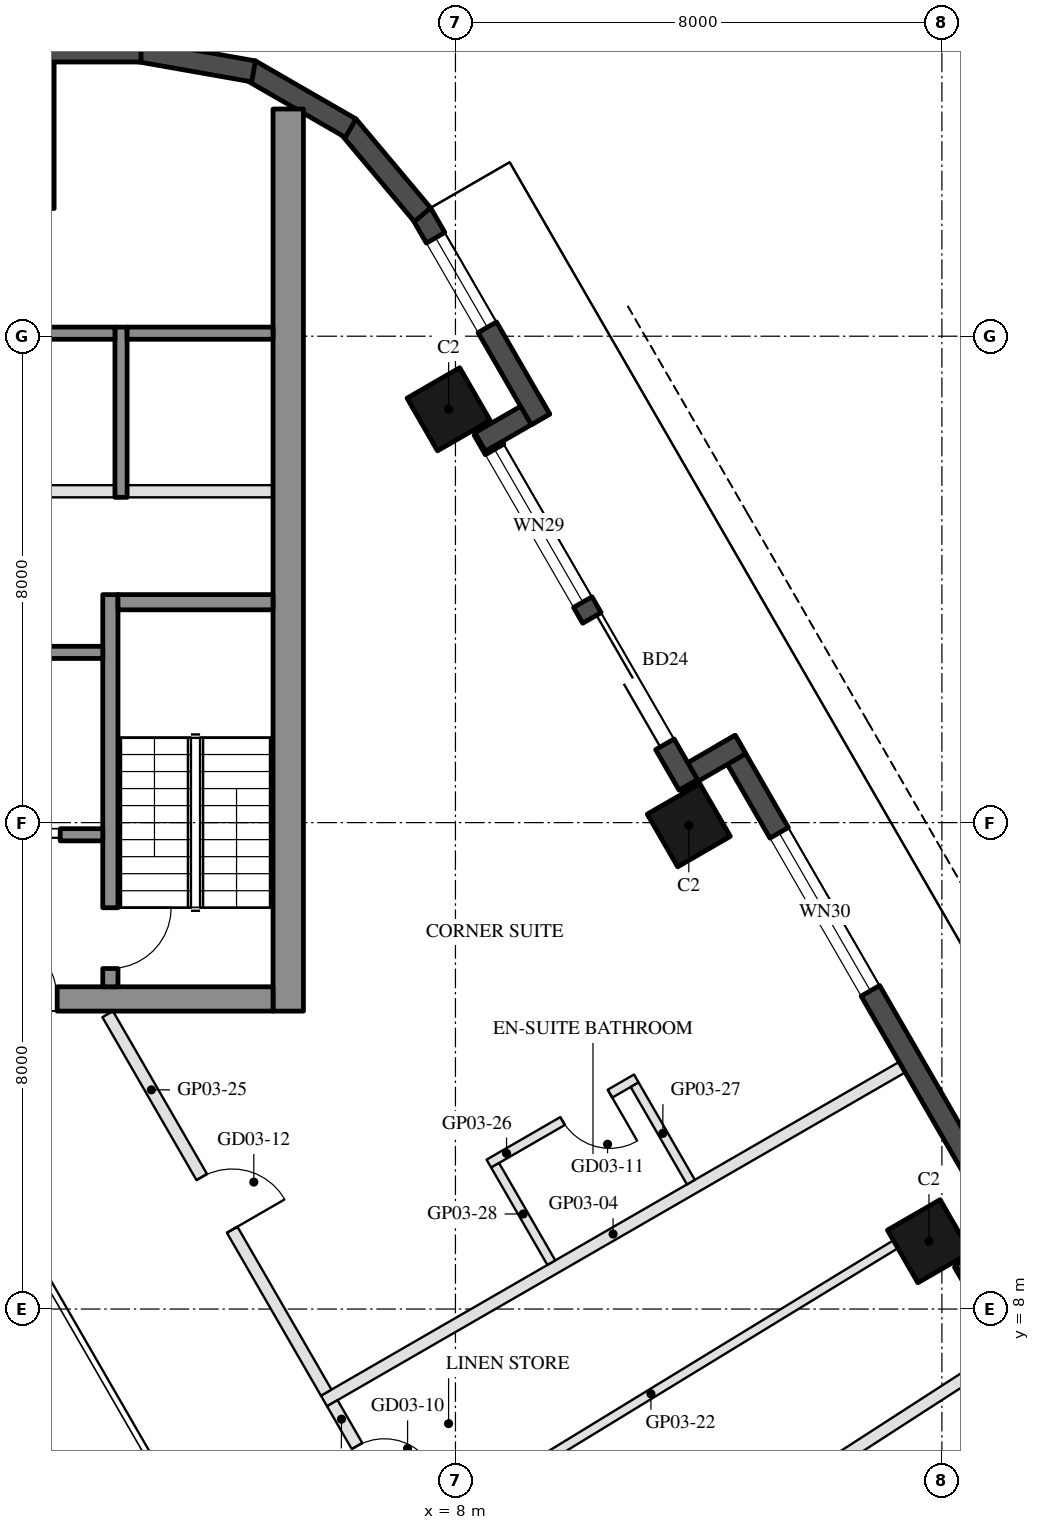
"""IFC4 building model, lengths in metres.
Left out: names, types, materials, properties, quantities, classifications, styles, units other than length and angle.
Written with IfcOpenShell. Run it as: python <this file> out.ifc"""

import sys

from ifc_helpers import new_model, si_unit, direction, frame, frame_2d, origin, origin_2d, place, context, subcontext, project, spatial, rectangle, hollow_rectangle, extrude, element, fill, save


model = new_model("IFC4")
c1 = context("Model", 3, precision=1e-05, world=origin(), true_north=direction((0.0, 1.0)))
c2 = subcontext(c1, "Body", "Model", "MODEL_VIEW")
j1 = project(units=[si_unit("LENGTHUNIT", "METRE"), si_unit("PLANEANGLEUNIT", "RADIAN")], contexts=[c1])
p1 = place(None, origin())
s1 = spatial("IfcSite", under=j1, at=p1, CompositionType="ELEMENT")
p2 = place(p1, origin())
s2 = spatial("IfcBuilding", under=s1, at=p2, CompositionType="ELEMENT")
p3 = place(p2, frame((0.0, 0.0, 65.0)))
s3 = spatial("IfcBuildingStorey", under=s2, at=p3, CompositionType="ELEMENT", Elevation=65.0)
for number, where, z_axis, x_axis in (
    (1, (15.788, 9.115, 0.0), (0.0, 0.0, 1.0), (-0.5, 0.866, 0.0)),
    (2, (11.838, 15.957, 0.0), (0.0, 0.0, 1.0), (-0.5, 0.866, 0.0)),
    (3, (7.888, 22.798, 0.0), (0.0, 0.0, 1.0), (-0.5, 0.866, 0.0)),
):
    element("IfcColumn", number, at=place(p3, frame(where, z_axis=z_axis, x_axis=x_axis)), inside=s3, PredefinedType="COLUMN", context=c2, shape_type="SweptSolid", body=[
        extrude(hollow_rectangle(XDim=1.0, YDim=1.0, WallThickness=0.045, at=origin_2d()), origin(), (0.0, 0.0, 1.0), 3.7),
    ])
p4 = place(p3, frame((0.0, 27.3, 0.0), z_axis=(0.0, 0.0, 1.0), x_axis=(1.0, 0.0, 0.0)))
e4 = element("IfcColumn", 4, at=p4, inside=s3, PredefinedType="COLUMN", context=c2, shape_type="SweptSolid", body=[
    extrude(hollow_rectangle(XDim=2.8, YDim=2.4, WallThickness=0.07, at=origin_2d()), origin(), (0.0, 0.0, 1.0), 3.7),
])
p5 = place(p3, frame((19.729, 2.938, 0.0), z_axis=(0.0, 0.0, 1.0), x_axis=(-0.499976430342, 0.866039011305, 0.0)))
e5 = element("IfcWall", 5, at=p5, inside=s3, PredefinedType="SOLIDWALL", context=c2, shape_type="SweptSolid", body=[
    extrude(rectangle(XDim=6.74, YDim=0.35, at=frame_2d((3.37, 0.0))), origin(), (0.0, 0.0, 1.0), 3.55),
])
p6 = place(p5, frame((0.77, 0.0, 0.3)))
e6 = element("IfcOpeningElement", 6, at=p6, cuts=e5, PredefinedType="OPENING", context=c2, shape_type="SweptSolid", body=[
    extrude(rectangle(XDim=1.7, YDim=2.65, at=frame_2d((0.85, 1.325))), frame((0.0, 0.185, 0.0), z_axis=(0.0, -1.0, 0.0), x_axis=(1.0, 0.0, 0.0)), (0.0, 0.0, 1.0), 0.37),
])
p7 = place(p5, frame((2.77, 0.0, 0.3)))
e7 = element("IfcOpeningElement", 7, at=p7, cuts=e5, PredefinedType="OPENING", context=c2, shape_type="SweptSolid", body=[
    extrude(rectangle(XDim=1.7, YDim=2.65, at=frame_2d((0.85, 1.325))), frame((0.0, 0.185, 0.0), z_axis=(0.0, -1.0, 0.0), x_axis=(1.0, 0.0, 0.0)), (0.0, 0.0, 1.0), 0.37),
])
p8 = place(p3, frame((16.306, 8.577, 0.0), z_axis=(0.0, 0.0, 1.0), x_axis=(0.866092288191, 0.499884134912, 0.0)))
e8 = element("IfcWall", 8, at=p8, inside=s3, PredefinedType="SOLIDWALL", context=c2, shape_type="SweptSolid", body=[
    extrude(rectangle(XDim=1.22, YDim=0.35, at=frame_2d((0.61, 0.0))), origin(), (0.0, 0.0, 1.0), 3.55),
])
p9 = place(p3, frame((17.299, 8.948, 0.0), z_axis=(0.0, 0.0, 1.0), x_axis=(-0.500010041276, 0.866019606374, 0.0)))
e9 = element("IfcWall", 9, at=p9, inside=s3, PredefinedType="SOLIDWALL", context=c2, shape_type="SweptSolid", body=[
    extrude(rectangle(XDim=9.7, YDim=0.35, at=frame_2d((4.85, 0.0))), origin(), (0.0, 0.0, 1.0), 3.55),
])
p10 = place(p9, frame((4.949, 0.0, 0.3)))
e10 = element("IfcOpeningElement", 10, at=p10, cuts=e9, PredefinedType="OPENING", context=c2, shape_type="SweptSolid", body=[
    extrude(rectangle(XDim=3.0, YDim=2.65, at=frame_2d((1.5, 1.325))), frame((0.0, 0.185, 0.0), z_axis=(0.0, -1.0, 0.0), x_axis=(1.0, 0.0, 0.0)), (0.0, 0.0, 1.0), 0.37),
])
p11 = place(p3, frame((12.688, 17.284, 0.0), z_axis=(0.0, 0.0, 1.0), x_axis=(-0.865955602162, -0.500120880472, 0.0)))
e11 = element("IfcWall", 11, at=p11, inside=s3, PredefinedType="SOLIDWALL", context=c2, shape_type="SweptSolid", body=[
    extrude(rectangle(XDim=1.22, YDim=0.35, at=frame_2d((0.61, 0.0))), origin(), (0.0, 0.0, 1.0), 3.55),
])
p12 = place(p3, frame((11.829, 16.621, 0.0), z_axis=(0.0, 0.0, 1.0), x_axis=(-0.500003597184, 0.866023326939, 0.0)))
e12 = element("IfcWall", 12, at=p12, inside=s3, PredefinedType="SOLIDWALL", context=c2, shape_type="SweptSolid", body=[
    extrude(rectangle(XDim=6.74, YDim=0.35, at=frame_2d((3.37, 0.0))), origin(), (0.0, 0.0, 1.0), 3.55),
])
p13 = place(p12, frame((0.77, 0.0, 0.0)))
e13 = element("IfcOpeningElement", 13, at=p13, cuts=e12, PredefinedType="OPENING", context=c2, shape_type="SweptSolid", body=[
    extrude(rectangle(XDim=2.4, YDim=2.4, at=frame_2d((1.2, 1.2))), frame((0.0, 0.185, 0.0), z_axis=(0.0, -1.0, 0.0), x_axis=(1.0, 0.0, 0.0)), (0.0, 0.0, 1.0), 0.37),
])
p14 = place(p12, frame((3.47, 0.0, 0.3)))
e14 = element("IfcOpeningElement", 14, at=p14, cuts=e12, PredefinedType="OPENING", context=c2, shape_type="SweptSolid", body=[
    extrude(rectangle(XDim=2.9, YDim=2.65, at=frame_2d((1.45, 1.325))), frame((0.0, 0.185, 0.0), z_axis=(0.0, -1.0, 0.0), x_axis=(1.0, 0.0, 0.0)), (0.0, 0.0, 1.0), 0.37),
])
p15 = place(p3, frame((8.406, 22.26, 0.0), z_axis=(0.0, 0.0, 1.0), x_axis=(0.865955602162, 0.500120880472, 0.0)))
e15 = element("IfcWall", 15, at=p15, inside=s3, PredefinedType="SOLIDWALL", context=c2, shape_type="SweptSolid", body=[
    extrude(rectangle(XDim=1.22, YDim=0.35, at=frame_2d((0.61, 0.0))), origin(), (0.0, 0.0, 1.0), 3.55),
])
p16 = place(p3, frame((9.398, 22.631, 0.0), z_axis=(0.0, 0.0, 1.0), x_axis=(-0.499954521343, 0.866051659307, 0.0)))
e16 = element("IfcWall", 16, at=p16, inside=s3, PredefinedType="SOLIDWALL", context=c2, shape_type="SweptSolid", body=[
    extrude(rectangle(XDim=3.916, YDim=0.35, at=frame_2d((1.958, 0.0))), origin(), (0.0, 0.0, 1.0), 3.55),
])
p17 = place(p16, frame((1.75, 0.0, 0.3)))
e17 = element("IfcOpeningElement", 17, at=p17, cuts=e16, PredefinedType="OPENING", context=c2, shape_type="SweptSolid", body=[
    extrude(rectangle(XDim=1.7, YDim=2.65, at=frame_2d((0.85, 1.325))), frame((0.0, 0.185, 0.0), z_axis=(0.0, -1.0, 0.0), x_axis=(1.0, 0.0, 0.0)), (0.0, 0.0, 1.0), 0.37),
])
p18 = place(p3, frame((7.458, 25.998, 0.0), z_axis=(0.0, 0.0, 1.0), x_axis=(-0.642808304945, 0.766027077259, 0.0)))
e18 = element("IfcWall", 18, at=p18, inside=s3, PredefinedType="SOLIDWALL", context=c2, shape_type="SweptSolid", body=[
    extrude(rectangle(XDim=1.91, YDim=0.35, at=frame_2d((0.955, 0.0))), origin(), (0.0, 0.0, 1.0), 3.55),
])
for number, where, z_axis, x_axis in (
    (19, (6.277, 27.422, 0.0), (0.0, 0.0, 1.0), (-0.866, 0.5, 0.0)),
    (20, (4.68, 28.356, 0.0), (0.0, 0.0, 1.0), (-0.985, 0.174, 0.0)),
):
    element("IfcWall", number, at=place(p3, frame(where, z_axis=z_axis, x_axis=x_axis)), inside=s3, PredefinedType="SOLIDWALL", context=c2, shape_type="SweptSolid", body=[
        extrude(rectangle(XDim=1.91, YDim=0.35, at=frame_2d((0.955, 0.0))), origin(), (0.0, 0.0, 1.0), 3.55),
    ])
p19 = place(p3, frame((2.829, 28.685, 0.0), z_axis=(0.0, 0.0, 1.0), x_axis=(-1.0, 0.0, 0.0)))
e21 = element("IfcWall", 21, at=p19, inside=s3, PredefinedType="SOLIDWALL", context=c2, shape_type="SweptSolid", body=[
    extrude(rectangle(XDim=5.658, YDim=0.35, at=frame_2d((2.829, 0.0))), origin(), (0.0, 0.0, 1.0), 3.55),
])
p20 = place(p3, frame((5.25, 12.9, 0.0), z_axis=(0.0, 0.0, 1.0), x_axis=(0.0, 1.0, 0.0)))
e22 = element("IfcWall", 22, at=p20, inside=s3, PredefinedType="SHEAR", context=c2, shape_type="SweptSolid", body=[
    extrude(rectangle(XDim=14.837, YDim=0.5, at=frame_2d((7.418, 0.0))), origin(), (0.0, 0.0, 1.0), 3.5),
])
p21 = place(p3, frame((5.0, 13.1, 0.0), z_axis=(0.0, 0.0, 1.0), x_axis=(-1.0, 0.0, 0.0)))
e23 = element("IfcWall", 23, at=p21, inside=s3, PredefinedType="SHEAR", context=c2, shape_type="SweptSolid", body=[
    extrude(rectangle(XDim=10.0, YDim=0.4, at=frame_2d((5.0, 0.0))), origin(), (0.0, 0.0, 1.0), 3.5),
])
p22 = place(p21, frame((3.55, 0.0, 0.0)))
e24 = element("IfcOpeningElement", 24, at=p22, cuts=e23, PredefinedType="OPENING", context=c2, shape_type="SweptSolid", body=[
    extrude(rectangle(XDim=1.1, YDim=2.1, at=frame_2d((0.55, 1.05))), frame((0.0, 0.21, 0.0), z_axis=(0.0, -1.0, 0.0), x_axis=(1.0, 0.0, 0.0)), (0.0, 0.0, 1.0), 0.42),
])
p23 = place(p21, frame((5.85, 0.0, 0.0)))
e25 = element("IfcOpeningElement", 25, at=p23, cuts=e23, PredefinedType="OPENING", context=c2, shape_type="SweptSolid", body=[
    extrude(rectangle(XDim=1.4, YDim=2.1, at=frame_2d((0.7, 1.05))), frame((0.0, 0.21, 0.0), z_axis=(0.0, -1.0, 0.0), x_axis=(1.0, 0.0, 0.0)), (0.0, 0.0, 1.0), 0.42),
])
p24 = place(p3, frame((2.325, 13.3, 0.0), z_axis=(0.0, 0.0, 1.0), x_axis=(0.0, 1.0, 0.0)))
e26 = element("IfcWall", 26, at=p24, inside=s3, PredefinedType="SHEAR", context=c2, shape_type="SweptSolid", body=[
    extrude(rectangle(XDim=6.45, YDim=0.25, at=frame_2d((3.225, 0.0))), origin(), (0.0, 0.0, 1.0), 3.5),
])
p25 = place(p24, frame((0.3, 0.0, 0.0)))
e27 = element("IfcOpeningElement", 27, at=p25, cuts=e26, PredefinedType="OPENING", context=c2, shape_type="SweptSolid", body=[
    extrude(rectangle(XDim=1.0, YDim=2.1, at=frame_2d((0.5, 1.05))), frame((0.0, 0.135, 0.0), z_axis=(0.0, -1.0, 0.0), x_axis=(1.0, 0.0, 0.0)), (0.0, 0.0, 1.0), 0.27),
])
p26 = place(p3, frame((5.0, 19.625, 0.0), z_axis=(0.0, 0.0, 1.0), x_axis=(-1.0, 0.0, 0.0)))
e28 = element("IfcWall", 28, at=p26, inside=s3, PredefinedType="SHEAR", context=c2, shape_type="SweptSolid", body=[
    extrude(rectangle(XDim=2.55, YDim=0.25, at=frame_2d((1.275, 0.0))), origin(), (0.0, 0.0, 1.0), 3.5),
])
p27 = place(p3, frame((2.2, 18.8, 0.0), z_axis=(0.0, 0.0, 1.0), x_axis=(-1.0, 0.0, 0.0)))
e29 = element("IfcWall", 29, at=p27, inside=s3, PredefinedType="SHEAR", context=c2, shape_type="SweptSolid", body=[
    extrude(rectangle(XDim=2.8, YDim=0.2, at=frame_2d((1.4, 0.0))), origin(), (0.0, 0.0, 1.0), 3.5),
])
p28 = place(p3, frame((2.2, 15.8, 0.0), z_axis=(0.0, 0.0, 1.0), x_axis=(-1.0, 0.0, 0.0)))
e30 = element("IfcWall", 30, at=p28, inside=s3, PredefinedType="SHEAR", context=c2, shape_type="SweptSolid", body=[
    extrude(rectangle(XDim=2.8, YDim=0.2, at=frame_2d((1.4, 0.0))), origin(), (0.0, 0.0, 1.0), 3.5),
])
p29 = place(p28, frame((0.7, 0.0, 0.0)))
e31 = element("IfcOpeningElement", 31, at=p29, cuts=e30, PredefinedType="OPENING", context=c2, shape_type="SweptSolid", body=[
    extrude(rectangle(XDim=1.2, YDim=2.1, at=frame_2d((0.6, 1.05))), frame((0.0, 0.11, 0.0), z_axis=(0.0, -1.0, 0.0), x_axis=(1.0, 0.0, 0.0)), (0.0, 0.0, 1.0), 0.22),
])
p30 = place(p3, frame((2.5, 21.35, 0.0), z_axis=(0.0, 0.0, 1.0), x_axis=(0.0, 1.0, 0.0)))
e32 = element("IfcWall", 32, at=p30, inside=s3, PredefinedType="SHEAR", context=c2, shape_type="SweptSolid", body=[
    extrude(rectangle(XDim=2.8, YDim=0.2, at=frame_2d((1.4, 0.0))), origin(), (0.0, 0.0, 1.0), 3.5),
])
p31 = place(p3, frame((5.0, 24.05, 0.0), z_axis=(0.0, 0.0, 1.0), x_axis=(-1.0, 0.0, 0.0)))
e33 = element("IfcWall", 33, at=p31, inside=s3, PredefinedType="SHEAR", context=c2, shape_type="SweptSolid", body=[
    extrude(rectangle(XDim=2.4, YDim=0.2, at=frame_2d((1.2, 0.0))), origin(), (0.0, 0.0, 1.0), 3.5),
])
p32 = place(p3, frame((2.4, 24.05, 0.0), z_axis=(0.0, 0.0, 1.0), x_axis=(-1.0, 0.0, 0.0)))
e34 = element("IfcWall", 34, at=p32, inside=s3, PredefinedType="SHEAR", context=c2, shape_type="SweptSolid", body=[
    extrude(rectangle(XDim=2.8, YDim=0.2, at=frame_2d((1.4, 0.0))), origin(), (0.0, 0.0, 1.0), 3.5),
])
p33 = place(p3, frame((5.0, 21.45, 0.0), z_axis=(0.0, 0.0, 1.0), x_axis=(-1.0, 0.0, 0.0)))
e35 = element("IfcWall", 35, at=p33, inside=s3, PredefinedType="PARTITIONING", context=c2, shape_type="SweptSolid", body=[
    extrude(rectangle(XDim=2.4, YDim=0.2, at=frame_2d((1.2, 0.0))), origin(), (0.0, 0.0, 1.0), 3.5),
])
p34 = place(p3, frame((2.4, 21.45, 0.0), z_axis=(0.0, 0.0, 1.0), x_axis=(-1.0, 0.0, 0.0)))
e36 = element("IfcWall", 36, at=p34, inside=s3, PredefinedType="PARTITIONING", context=c2, shape_type="SweptSolid", body=[
    extrude(rectangle(XDim=2.8, YDim=0.2, at=frame_2d((1.4, 0.0))), origin(), (0.0, 0.0, 1.0), 3.5),
])
p35 = place(p3, frame((17.02, 7.28, 0.0), z_axis=(0.0, 0.0, 1.0), x_axis=(-0.839924980805, -0.542702521294, 0.0)))
e37 = element("IfcWall", 37, at=p35, inside=s3, PredefinedType="PARTITIONING", context=c2, shape_type="SweptSolid", body=[
    extrude(rectangle(XDim=10.093, YDim=0.2, at=frame_2d((5.046, 0.0))), origin(), (0.0, 0.0, 1.0), 2.96),
])
p36 = place(p3, frame((15.347, 11.978, 0.0), z_axis=(0.0, 0.0, 1.0), x_axis=(-0.866027479907, -0.499996404033, 0.0)))
e38 = element("IfcWall", 38, at=p36, inside=s3, PredefinedType="PARTITIONING", context=c2, shape_type="SweptSolid", body=[
    extrude(rectangle(XDim=10.98, YDim=0.2, at=frame_2d((5.49, 0.0))), origin(), (0.0, 0.0, 1.0), 2.96),
])
p37 = place(p3, frame((15.239, 9.065, 0.0), z_axis=(0.0, 0.0, 1.0), x_axis=(-0.853241525467, -0.521515962573, 0.0)))
e39 = element("IfcWall", 39, at=p37, inside=s3, PredefinedType="PARTITIONING", context=c2, shape_type="SweptSolid", body=[
    extrude(rectangle(XDim=9.433, YDim=0.15, at=frame_2d((4.716, 0.0))), origin(), (0.0, 0.0, 1.0), 2.95),
])
p38 = place(p3, frame((5.975, 6.452, 0.0), z_axis=(0.0, 0.0, 1.0), x_axis=(0.499962146402, -0.866047257466, 0.0)))
e40 = element("IfcWall", 40, at=p38, inside=s3, PredefinedType="PARTITIONING", context=c2, shape_type="SweptSolid", body=[
    extrude(rectangle(XDim=2.528, YDim=0.2, at=frame_2d((1.264, 0.0))), origin(), (0.0, 0.0, 1.0), 2.95),
])
p39 = place(p38, frame((0.814, 0.0, 0.0)))
e41 = element("IfcOpeningElement", 41, at=p39, cuts=e40, PredefinedType="OPENING", context=c2, shape_type="SweptSolid", body=[
    extrude(rectangle(XDim=0.9, YDim=2.1, at=frame_2d((0.45, 1.05))), frame((0.0, 0.11, 0.0), z_axis=(0.0, -1.0, 0.0), x_axis=(1.0, 0.0, 0.0)), (0.0, 0.0, 1.0), 0.22),
])
p40 = place(p3, frame((2.281, 12.85, 0.0), z_axis=(0.0, 0.0, 1.0), x_axis=(0.499992939664, -0.866029480033, 0.0)))
e42 = element("IfcWall", 42, at=p40, inside=s3, PredefinedType="PARTITIONING", context=c2, shape_type="SweptSolid", body=[
    extrude(rectangle(XDim=7.188, YDim=0.2, at=frame_2d((3.594, 0.0))), origin(), (0.0, 0.0, 1.0), 2.95),
])
p41 = place(p40, frame((3.094, 0.0, 0.0)))
e43 = element("IfcOpeningElement", 43, at=p41, cuts=e42, PredefinedType="OPENING", context=c2, shape_type="SweptSolid", body=[
    extrude(rectangle(XDim=1.0, YDim=2.1, at=frame_2d((0.5, 1.05))), frame((0.0, 0.11, 0.0), z_axis=(0.0, -1.0, 0.0), x_axis=(1.0, 0.0, 0.0)), (0.0, 0.0, 1.0), 0.22),
])
p42 = place(p3, frame((10.974, 11.792, 0.0), z_axis=(0.0, 0.0, 1.0), x_axis=(-0.866056369097, -0.49994636267, 0.0)))
e44 = element("IfcWall", 44, at=p42, inside=s3, PredefinedType="PARTITIONING", context=c2, shape_type="SweptSolid", body=[
    extrude(rectangle(XDim=2.8, YDim=0.15, at=frame_2d((1.4, 0.0))), origin(), (0.0, 0.0, 1.0), 3.55),
])
p43 = place(p42, frame((0.5, 0.0, 0.0)))
e45 = element("IfcOpeningElement", 45, at=p43, cuts=e44, PredefinedType="OPENING", context=c2, shape_type="SweptSolid", body=[
    extrude(rectangle(XDim=0.9, YDim=2.1, at=frame_2d((0.45, 1.05))), frame((0.0, 0.085, 0.0), z_axis=(0.0, -1.0, 0.0), x_axis=(1.0, 0.0, 0.0)), (0.0, 0.0, 1.0), 0.17),
])
for number, where, z_axis, x_axis in (
    (46, (11.872, 10.087, 0.0), (0.0, 0.0, 1.0), (-0.5, 0.866, 0.0)),
    (47, (9.577, 8.762, 0.0), (0.0, 0.0, 1.0), (-0.5, 0.866, 0.0)),
):
    element("IfcWall", number, at=place(p3, frame(where, z_axis=z_axis, x_axis=x_axis)), inside=s3, PredefinedType="PARTITIONING", context=c2, shape_type="SweptSolid", body=[
        extrude(rectangle(XDim=1.85, YDim=0.15, at=frame_2d((0.925, 0.0))), origin(), (0.0, 0.0, 1.0), 2.95),
    ])
p44 = place(p10, origin())
e48 = element("IfcWindow", 48, at=p44, inside=s3, PartitioningType="SINGLE_PANEL", PredefinedType="WINDOW", context=c2, shape_type="SweptSolid", body=[
    extrude(rectangle(XDim=3.0, YDim=2.65, at=frame_2d((1.5, 1.325))), frame((0.0, 0.03, 0.0), z_axis=(0.0, -1.0, 0.0), x_axis=(1.0, 0.0, 0.0)), (0.0, 0.0, 1.0), 0.06),
])
fill(e10, e48)
p45 = place(p13, frame((2.4, 0.0, 0.0), z_axis=(0.0, 0.0, 1.0), x_axis=(-1.0, 0.0, 0.0)))
e49 = element("IfcDoor", 49, at=p45, inside=s3, OperationType="SLIDING_TO_LEFT", PredefinedType="DOOR", context=c2, shape_type="SweptSolid", body=[
    extrude(rectangle(XDim=2.4, YDim=2.4, at=frame_2d((1.2, 1.2))), frame((0.0, 0.025, 0.0), z_axis=(0.0, -1.0, 0.0), x_axis=(1.0, 0.0, 0.0)), (0.0, 0.0, 1.0), 0.05),
])
fill(e13, e49)
p46 = place(p14, origin())
e50 = element("IfcWindow", 50, at=p46, inside=s3, PartitioningType="SINGLE_PANEL", PredefinedType="WINDOW", context=c2, shape_type="SweptSolid", body=[
    extrude(rectangle(XDim=2.9, YDim=2.65, at=frame_2d((1.45, 1.325))), frame((0.0, 0.03, 0.0), z_axis=(0.0, -1.0, 0.0), x_axis=(1.0, 0.0, 0.0)), (0.0, 0.0, 1.0), 0.06),
])
fill(e14, e50)
p47 = place(p17, origin())
e51 = element("IfcWindow", 51, at=p47, inside=s3, PartitioningType="SINGLE_PANEL", PredefinedType="WINDOW", context=c2, shape_type="SweptSolid", body=[
    extrude(rectangle(XDim=1.7, YDim=2.65, at=frame_2d((0.85, 1.325))), frame((0.0, 0.03, 0.0), z_axis=(0.0, -1.0, 0.0), x_axis=(1.0, 0.0, 0.0)), (0.0, 0.0, 1.0), 0.06),
])
fill(e17, e51)
p48 = place(p29, origin())
e52 = element("IfcDoor", 52, at=p48, inside=s3, OperationType="DOUBLE_DOOR_SLIDING", PredefinedType="DOOR", context=c2, shape_type="SweptSolid", body=[
    extrude(rectangle(XDim=1.2, YDim=2.1, at=frame_2d((0.6, 1.05))), frame((0.0, 0.025, 0.0), z_axis=(0.0, -1.0, 0.0), x_axis=(1.0, 0.0, 0.0)), (0.0, 0.0, 1.0), 0.05),
])
fill(e31, e52)
p49 = place(p22, frame((1.1, 0.0, 0.0), z_axis=(0.0, 0.0, 1.0), x_axis=(-1.0, 0.0, 0.0)))
e53 = element("IfcDoor", 53, at=p49, inside=s3, OperationType="SINGLE_SWING_LEFT", PredefinedType="DOOR", context=c2, shape_type="SweptSolid", body=[
    extrude(rectangle(XDim=1.1, YDim=2.1, at=frame_2d((0.55, 1.05))), frame((0.0, 0.025, 0.0), z_axis=(0.0, -1.0, 0.0), x_axis=(1.0, 0.0, 0.0)), (0.0, 0.0, 1.0), 0.05),
])
fill(e24, e53)
p50 = place(p25, frame((1.0, 0.0, 0.0), z_axis=(0.0, 0.0, 1.0), x_axis=(-1.0, 0.0, 0.0)))
e54 = element("IfcDoor", 54, at=p50, inside=s3, OperationType="SINGLE_SWING_LEFT", PredefinedType="DOOR", context=c2, shape_type="SweptSolid", body=[
    extrude(rectangle(XDim=1.0, YDim=2.1, at=frame_2d((0.5, 1.05))), frame((0.0, 0.025, 0.0), z_axis=(0.0, -1.0, 0.0), x_axis=(1.0, 0.0, 0.0)), (0.0, 0.0, 1.0), 0.05),
])
fill(e27, e54)
p51 = place(p39, origin())
e55 = element("IfcDoor", 55, at=p51, inside=s3, OperationType="SINGLE_SWING_RIGHT", PredefinedType="DOOR", context=c2, shape_type="SweptSolid", body=[
    extrude(rectangle(XDim=0.9, YDim=2.1, at=frame_2d((0.45, 1.05))), frame((0.0, 0.025, 0.0), z_axis=(0.0, -1.0, 0.0), x_axis=(1.0, 0.0, 0.0)), (0.0, 0.0, 1.0), 0.05),
])
fill(e41, e55)
p52 = place(p43, origin())
e56 = element("IfcDoor", 56, at=p52, inside=s3, OperationType="SINGLE_SWING_LEFT", PredefinedType="DOOR", context=c2, shape_type="SweptSolid", body=[
    extrude(rectangle(XDim=0.9, YDim=2.1, at=frame_2d((0.45, 1.05))), frame((0.0, 0.025, 0.0), z_axis=(0.0, -1.0, 0.0), x_axis=(1.0, 0.0, 0.0)), (0.0, 0.0, 1.0), 0.05),
])
fill(e45, e56)
p53 = place(p41, origin())
e57 = element("IfcDoor", 57, at=p53, inside=s3, OperationType="SINGLE_SWING_RIGHT", PredefinedType="DOOR", context=c2, shape_type="SweptSolid", body=[
    extrude(rectangle(XDim=1.0, YDim=2.1, at=frame_2d((0.5, 1.05))), frame((0.0, 0.025, 0.0), z_axis=(0.0, -1.0, 0.0), x_axis=(1.0, 0.0, 0.0)), (0.0, 0.0, 1.0), 0.05),
])
fill(e43, e57)
save(model, sys.argv[1])
